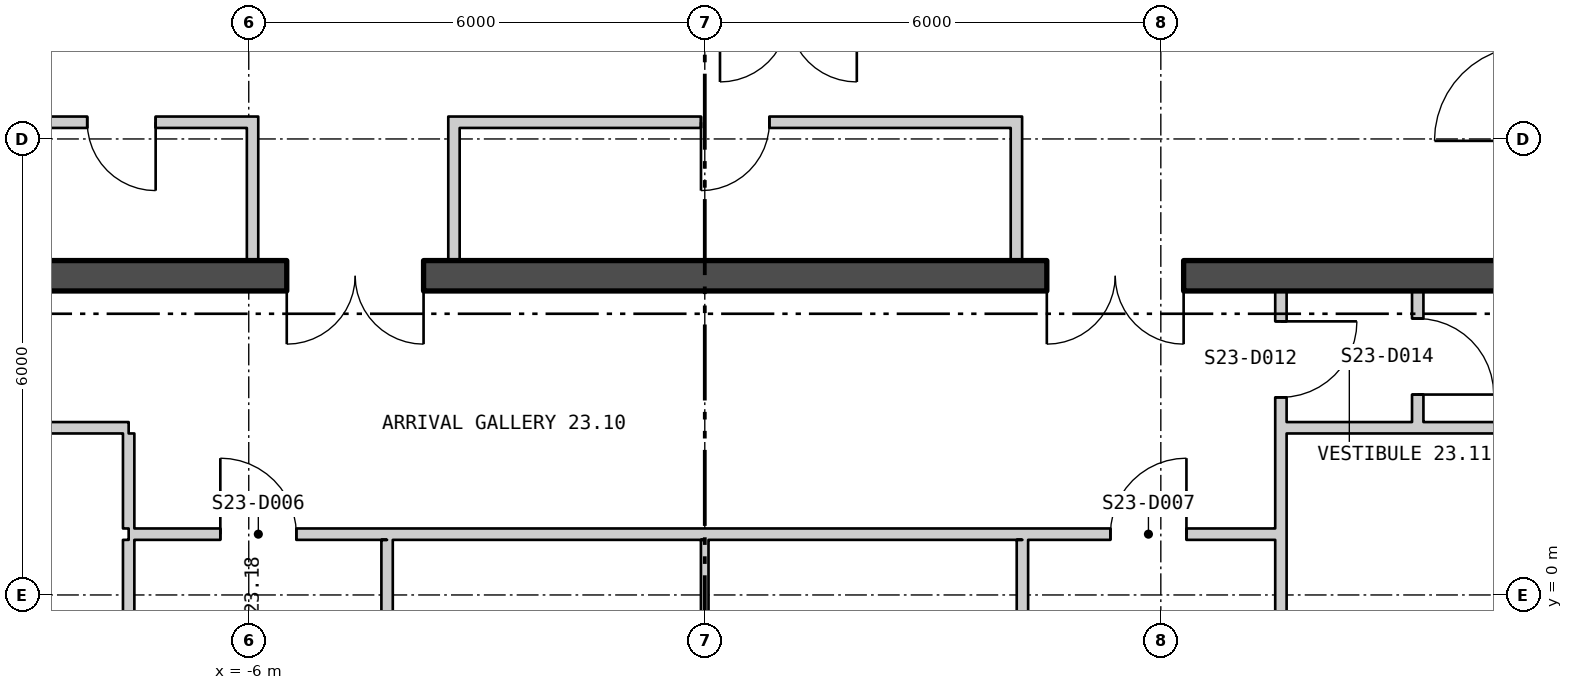
"""IFC4 building model, lengths in metres.
Left out: names, types, materials, properties, quantities, classifications, styles, units other than length and angle.
Written with IfcOpenShell. Run it as: python <this file> out.ifc"""

import sys

from ifc_helpers import new_model, si_unit, direction, frame, frame_2d, origin, place, context, subcontext, project, spatial, polyline, rectangle, outline, extrude, element, fill, save


model = new_model("IFC4")
c1 = context("Model", 3, precision=1e-05, world=origin(), true_north=direction((0.0, 1.0)))
c2 = subcontext(c1, "Body", "Model", "MODEL_VIEW")
j1 = project(units=[si_unit("LENGTHUNIT", "METRE"), si_unit("PLANEANGLEUNIT", "RADIAN")], contexts=[c1])
p1 = place(None, origin())
s1 = spatial("IfcSite", under=j1, at=p1, CompositionType="ELEMENT")
p2 = place(p1, origin())
s2 = spatial("IfcBuilding", under=s1, at=p2, CompositionType="ELEMENT")
p3 = place(p2, frame((0.0, 0.0, 304.2)))
s3 = spatial("IfcBuildingStorey", under=s2, at=p3, CompositionType="ELEMENT", Elevation=304.2)
p4 = place(p3, frame((-25.095, 16.112, -0.18), z_axis=(0.0, 0.0, 1.0), x_axis=(0.500000141277, -0.866025322218, 0.0)))
e1 = element("IfcWall", 1, at=p4, inside=s3, PredefinedType="SOLIDWALL", context=c2, shape_type="SweptSolid", body=[
    extrude(outline(polyline([(-0.13, -0.225), (45.86, -0.225), (45.6, 0.225), (0.13, 0.225), (-0.13, -0.225)])), origin(), (0.0, 0.0, 1.0), 3.98),
])
p5 = place(p4, frame((1.424, 0.0, 1.08)))
e2 = element("IfcOpeningElement", 2, at=p5, cuts=e1, PredefinedType="OPENING", context=c2, shape_type="SweptSolid", body=[
    extrude(rectangle(XDim=2.4, YDim=2.3, at=frame_2d((1.2, 1.15))), frame((0.0, 0.235, 0.0), z_axis=(0.0, -1.0, 0.0), x_axis=(1.0, 0.0, 0.0)), (0.0, 0.0, 1.0), 0.47),
])
p6 = place(p4, frame((5.892, 0.0, 1.08)))
e3 = element("IfcOpeningElement", 3, at=p6, cuts=e1, PredefinedType="OPENING", context=c2, shape_type="SweptSolid", body=[
    extrude(rectangle(XDim=2.4, YDim=2.3, at=frame_2d((1.2, 1.15))), frame((0.0, 0.235, 0.0), z_axis=(0.0, -1.0, 0.0), x_axis=(1.0, 0.0, 0.0)), (0.0, 0.0, 1.0), 0.47),
])
p7 = place(p4, frame((10.399, 0.0, 1.08)))
e4 = element("IfcOpeningElement", 4, at=p7, cuts=e1, PredefinedType="OPENING", context=c2, shape_type="SweptSolid", body=[
    extrude(rectangle(XDim=2.4, YDim=2.3, at=frame_2d((1.2, 1.15))), frame((0.0, 0.235, 0.0), z_axis=(0.0, -1.0, 0.0), x_axis=(1.0, 0.0, 0.0)), (0.0, 0.0, 1.0), 0.47),
])
p8 = place(p4, frame((14.905, 0.0, 1.08)))
e5 = element("IfcOpeningElement", 5, at=p8, cuts=e1, PredefinedType="OPENING", context=c2, shape_type="SweptSolid", body=[
    extrude(rectangle(XDim=2.4, YDim=2.3, at=frame_2d((1.2, 1.15))), frame((0.0, 0.235, 0.0), z_axis=(0.0, -1.0, 0.0), x_axis=(1.0, 0.0, 0.0)), (0.0, 0.0, 1.0), 0.47),
])
p9 = place(p4, frame((19.412, 0.0, 1.08)))
e6 = element("IfcOpeningElement", 6, at=p9, cuts=e1, PredefinedType="OPENING", context=c2, shape_type="SweptSolid", body=[
    extrude(rectangle(XDim=2.4, YDim=2.3, at=frame_2d((1.2, 1.15))), frame((0.0, 0.235, 0.0), z_axis=(0.0, -1.0, 0.0), x_axis=(1.0, 0.0, 0.0)), (0.0, 0.0, 1.0), 0.47),
])
p10 = place(p4, frame((28.425, 0.0, 1.08)))
e7 = element("IfcOpeningElement", 7, at=p10, cuts=e1, PredefinedType="OPENING", context=c2, shape_type="SweptSolid", body=[
    extrude(rectangle(XDim=2.4, YDim=2.3, at=frame_2d((1.2, 1.15))), frame((0.0, 0.235, 0.0), z_axis=(0.0, -1.0, 0.0), x_axis=(1.0, 0.0, 0.0)), (0.0, 0.0, 1.0), 0.47),
])
p11 = place(p4, frame((32.932, 0.0, 1.08)))
e8 = element("IfcOpeningElement", 8, at=p11, cuts=e1, PredefinedType="OPENING", context=c2, shape_type="SweptSolid", body=[
    extrude(rectangle(XDim=2.4, YDim=2.3, at=frame_2d((1.2, 1.15))), frame((0.0, 0.235, 0.0), z_axis=(0.0, -1.0, 0.0), x_axis=(1.0, 0.0, 0.0)), (0.0, 0.0, 1.0), 0.47),
])
p12 = place(p4, frame((37.438, 0.0, 1.08)))
e9 = element("IfcOpeningElement", 9, at=p12, cuts=e1, PredefinedType="OPENING", context=c2, shape_type="SweptSolid", body=[
    extrude(rectangle(XDim=2.4, YDim=2.3, at=frame_2d((1.2, 1.15))), frame((0.0, 0.235, 0.0), z_axis=(0.0, -1.0, 0.0), x_axis=(1.0, 0.0, 0.0)), (0.0, 0.0, 1.0), 0.47),
])
p13 = place(p4, frame((41.907, 0.0, 1.08)))
e10 = element("IfcOpeningElement", 10, at=p13, cuts=e1, PredefinedType="OPENING", context=c2, shape_type="SweptSolid", body=[
    extrude(rectangle(XDim=2.4, YDim=2.3, at=frame_2d((1.2, 1.15))), frame((0.0, 0.235, 0.0), z_axis=(0.0, -1.0, 0.0), x_axis=(1.0, 0.0, 0.0)), (0.0, 0.0, 1.0), 0.47),
])
p14 = place(p3, frame((2.23, -23.491, -0.18), z_axis=(0.0, 0.0, 1.0), x_axis=(0.500000141277, 0.866025322218, 0.0)))
e11 = element("IfcWall", 11, at=p14, inside=s3, PredefinedType="SOLIDWALL", context=c2, shape_type="SweptSolid", body=[
    extrude(outline(polyline([(-0.13, -0.225), (45.86, -0.225), (45.6, 0.225), (0.13, 0.225), (-0.13, -0.225)])), origin(), (0.0, 0.0, 1.0), 3.98),
])
p15 = place(p14, frame((1.424, 0.0, 1.08)))
e12 = element("IfcOpeningElement", 12, at=p15, cuts=e11, PredefinedType="OPENING", context=c2, shape_type="SweptSolid", body=[
    extrude(rectangle(XDim=2.4, YDim=2.3, at=frame_2d((1.2, 1.15))), frame((0.0, 0.235, 0.0), z_axis=(0.0, -1.0, 0.0), x_axis=(1.0, 0.0, 0.0)), (0.0, 0.0, 1.0), 0.47),
])
p16 = place(p14, frame((5.892, 0.0, 1.08)))
e13 = element("IfcOpeningElement", 13, at=p16, cuts=e11, PredefinedType="OPENING", context=c2, shape_type="SweptSolid", body=[
    extrude(rectangle(XDim=2.4, YDim=2.3, at=frame_2d((1.2, 1.15))), frame((0.0, 0.235, 0.0), z_axis=(0.0, -1.0, 0.0), x_axis=(1.0, 0.0, 0.0)), (0.0, 0.0, 1.0), 0.47),
])
p17 = place(p14, frame((10.399, 0.0, 1.08)))
e14 = element("IfcOpeningElement", 14, at=p17, cuts=e11, PredefinedType="OPENING", context=c2, shape_type="SweptSolid", body=[
    extrude(rectangle(XDim=2.4, YDim=2.3, at=frame_2d((1.2, 1.15))), frame((0.0, 0.235, 0.0), z_axis=(0.0, -1.0, 0.0), x_axis=(1.0, 0.0, 0.0)), (0.0, 0.0, 1.0), 0.47),
])
p18 = place(p14, frame((14.905, 0.0, 1.08)))
e15 = element("IfcOpeningElement", 15, at=p18, cuts=e11, PredefinedType="OPENING", context=c2, shape_type="SweptSolid", body=[
    extrude(rectangle(XDim=2.4, YDim=2.3, at=frame_2d((1.2, 1.15))), frame((0.0, 0.235, 0.0), z_axis=(0.0, -1.0, 0.0), x_axis=(1.0, 0.0, 0.0)), (0.0, 0.0, 1.0), 0.47),
])
p19 = place(p14, frame((19.412, 0.0, 1.08)))
e16 = element("IfcOpeningElement", 16, at=p19, cuts=e11, PredefinedType="OPENING", context=c2, shape_type="SweptSolid", body=[
    extrude(rectangle(XDim=2.4, YDim=2.3, at=frame_2d((1.2, 1.15))), frame((0.0, 0.235, 0.0), z_axis=(0.0, -1.0, 0.0), x_axis=(1.0, 0.0, 0.0)), (0.0, 0.0, 1.0), 0.47),
])
p20 = place(p14, frame((23.918, 0.0, 1.08)))
e17 = element("IfcOpeningElement", 17, at=p20, cuts=e11, PredefinedType="OPENING", context=c2, shape_type="SweptSolid", body=[
    extrude(rectangle(XDim=2.4, YDim=2.3, at=frame_2d((1.2, 1.15))), frame((0.0, 0.235, 0.0), z_axis=(0.0, -1.0, 0.0), x_axis=(1.0, 0.0, 0.0)), (0.0, 0.0, 1.0), 0.47),
])
p21 = place(p14, frame((28.425, 0.0, 1.08)))
e18 = element("IfcOpeningElement", 18, at=p21, cuts=e11, PredefinedType="OPENING", context=c2, shape_type="SweptSolid", body=[
    extrude(rectangle(XDim=2.4, YDim=2.3, at=frame_2d((1.2, 1.15))), frame((0.0, 0.235, 0.0), z_axis=(0.0, -1.0, 0.0), x_axis=(1.0, 0.0, 0.0)), (0.0, 0.0, 1.0), 0.47),
])
p22 = place(p14, frame((32.932, 0.0, 1.08)))
e19 = element("IfcOpeningElement", 19, at=p22, cuts=e11, PredefinedType="OPENING", context=c2, shape_type="SweptSolid", body=[
    extrude(rectangle(XDim=2.4, YDim=2.3, at=frame_2d((1.2, 1.15))), frame((0.0, 0.235, 0.0), z_axis=(0.0, -1.0, 0.0), x_axis=(1.0, 0.0, 0.0)), (0.0, 0.0, 1.0), 0.47),
])
p23 = place(p14, frame((37.438, 0.0, 1.08)))
e20 = element("IfcOpeningElement", 20, at=p23, cuts=e11, PredefinedType="OPENING", context=c2, shape_type="SweptSolid", body=[
    extrude(rectangle(XDim=2.4, YDim=2.3, at=frame_2d((1.2, 1.15))), frame((0.0, 0.235, 0.0), z_axis=(0.0, -1.0, 0.0), x_axis=(1.0, 0.0, 0.0)), (0.0, 0.0, 1.0), 0.47),
])
p24 = place(p14, frame((41.907, 0.0, 1.08)))
e21 = element("IfcOpeningElement", 21, at=p24, cuts=e11, PredefinedType="OPENING", context=c2, shape_type="SweptSolid", body=[
    extrude(rectangle(XDim=2.4, YDim=2.3, at=frame_2d((1.2, 1.15))), frame((0.0, 0.235, 0.0), z_axis=(0.0, -1.0, 0.0), x_axis=(1.0, 0.0, 0.0)), (0.0, 0.0, 1.0), 0.47),
])
p25 = place(p3, frame((-14.5, 4.2, 0.0), z_axis=(0.0, 0.0, 1.0), x_axis=(1.0, 0.0, 0.0)))
e22 = element("IfcWall", 22, at=p25, inside=s3, PredefinedType="SHEAR", context=c2, shape_type="SweptSolid", body=[
    extrude(rectangle(XDim=29.0, YDim=0.4, at=frame_2d((14.5, 0.0))), origin(), (0.0, 0.0, 1.0), 4.0),
])
p26 = place(p25, frame((9.0, 0.0, 0.0)))
e23 = element("IfcOpeningElement", 23, at=p26, cuts=e22, PredefinedType="OPENING", context=c2, shape_type="SweptSolid", body=[
    extrude(rectangle(XDim=1.8, YDim=2.4, at=frame_2d((0.9, 1.2))), frame((0.0, 0.21, 0.0), z_axis=(0.0, -1.0, 0.0), x_axis=(1.0, 0.0, 0.0)), (0.0, 0.0, 1.0), 0.42),
])
p27 = place(p25, frame((19.0, 0.0, 0.0)))
e24 = element("IfcOpeningElement", 24, at=p27, cuts=e22, PredefinedType="OPENING", context=c2, shape_type="SweptSolid", body=[
    extrude(rectangle(XDim=1.8, YDim=2.4, at=frame_2d((0.9, 1.2))), frame((0.0, 0.21, 0.0), z_axis=(0.0, -1.0, 0.0), x_axis=(1.0, 0.0, 0.0)), (0.0, 0.0, 1.0), 0.42),
])
p28 = place(p3, frame((-5.95, 4.4, 0.0), z_axis=(0.0, 0.0, 1.0), x_axis=(0.0, 1.0, 0.0)))
e25 = element("IfcWall", 25, at=p28, inside=s3, PredefinedType="PARTITIONING", context=c2, shape_type="SweptSolid", body=[
    extrude(rectangle(XDim=1.895, YDim=0.15, at=frame_2d((0.948, 0.0))), origin(), (0.0, 0.0, 1.0), 4.0),
])
p29 = place(p3, frame((-9.325, 6.22, 0.0), z_axis=(0.0, 0.0, 1.0), x_axis=(1.0, 0.0, 0.0)))
e26 = element("IfcWall", 26, at=p29, inside=s3, PredefinedType="PARTITIONING", context=c2, shape_type="SweptSolid", body=[
    extrude(rectangle(XDim=3.3, YDim=0.15, at=frame_2d((1.65, 0.0))), origin(), (0.0, 0.0, 1.0), 4.0),
])
p30 = place(p29, frame((1.2, 0.0, 0.0)))
e27 = element("IfcOpeningElement", 27, at=p30, cuts=e26, PredefinedType="OPENING", context=c2, shape_type="SweptSolid", body=[
    extrude(rectangle(XDim=0.9, YDim=2.1, at=frame_2d((0.45, 1.05))), frame((0.0, 0.085, 0.0), z_axis=(0.0, -1.0, 0.0), x_axis=(1.0, 0.0, 0.0)), (0.0, 0.0, 1.0), 0.17),
])
for number, where, z_axis, x_axis in (
    (28, (-3.3, 4.4, 0.0), (0.0, 0.0, 1.0), (0.0, 1.0, 0.0)),
    (29, (4.1, 4.4, 0.0), (0.0, 0.0, 1.0), (0.0, 1.0, 0.0)),
):
    element("IfcWall", number, at=place(p3, frame(where, z_axis=z_axis, x_axis=x_axis)), inside=s3, PredefinedType="PARTITIONING", context=c2, shape_type="SweptSolid", body=[
        extrude(rectangle(XDim=1.895, YDim=0.15, at=frame_2d((0.948, 0.0))), origin(), (0.0, 0.0, 1.0), 4.0),
    ])
p31 = place(p3, frame((-3.225, 6.22, 0.0), z_axis=(0.0, 0.0, 1.0), x_axis=(1.0, 0.0, 0.0)))
e30 = element("IfcWall", 30, at=p31, inside=s3, PredefinedType="PARTITIONING", context=c2, shape_type="SweptSolid", body=[
    extrude(rectangle(XDim=7.25, YDim=0.15, at=frame_2d((3.625, 0.0))), origin(), (0.0, 0.0, 1.0), 4.0),
])
p32 = place(p31, frame((3.175, 0.0, 0.0)))
e31 = element("IfcOpeningElement", 31, at=p32, cuts=e30, PredefinedType="OPENING", context=c2, shape_type="SweptSolid", body=[
    extrude(rectangle(XDim=0.9, YDim=2.1, at=frame_2d((0.45, 1.05))), frame((0.0, 0.085, 0.0), z_axis=(0.0, -1.0, 0.0), x_axis=(1.0, 0.0, 0.0)), (0.0, 0.0, 1.0), 0.17),
])
p33 = place(p3, frame((-16.225, 2.2, 0.0), z_axis=(0.0, 0.0, 1.0), x_axis=(1.0, 0.0, 0.0)))
e32 = element("IfcWall", 32, at=p33, inside=s3, PredefinedType="PARTITIONING", context=c2, shape_type="SweptSolid", body=[
    extrude(rectangle(XDim=8.645, YDim=0.15, at=frame_2d((4.322, 0.0))), origin(), (0.0, 0.0, 1.0), 4.0),
])
p34 = place(p33, frame((5.714, 0.0, 0.0)))
e33 = element("IfcOpeningElement", 33, at=p34, cuts=e32, PredefinedType="OPENING", context=c2, shape_type="SweptSolid", body=[
    extrude(rectangle(XDim=1.0, YDim=2.1, at=frame_2d((0.5, 1.05))), frame((0.0, 0.085, 0.0), z_axis=(0.0, -1.0, 0.0), x_axis=(1.0, 0.0, 0.0)), (0.0, 0.0, 1.0), 0.17),
])
p35 = place(p3, frame((-7.58, -2.582, 0.0), z_axis=(0.0, 0.0, 1.0), x_axis=(0.0, 1.0, 0.0)))
e34 = element("IfcWall", 34, at=p35, inside=s3, PredefinedType="PARTITIONING", context=c2, shape_type="SweptSolid", body=[
    extrude(rectangle(XDim=3.307, YDim=0.15, at=frame_2d((1.653, 0.0))), origin(), (0.0, 0.0, 1.0), 4.0),
])
p36 = place(p3, frame((-7.58, 0.8, 0.0), z_axis=(0.0, 0.0, 1.0), x_axis=(1.0, 0.0, 0.0)))
e35 = element("IfcWall", 35, at=p36, inside=s3, PredefinedType="PARTITIONING", context=c2, shape_type="SweptSolid", body=[
    extrude(rectangle(XDim=15.085, YDim=0.15, at=frame_2d((7.543, 0.0))), origin(), (0.0, 0.0, 1.0), 4.0),
])
p37 = place(p36, frame((1.206, 0.0, 0.0)))
e36 = element("IfcOpeningElement", 36, at=p37, cuts=e35, PredefinedType="OPENING", context=c2, shape_type="SweptSolid", body=[
    extrude(rectangle(XDim=1.0, YDim=2.1, at=frame_2d((0.5, 1.05))), frame((0.0, 0.085, 0.0), z_axis=(0.0, -1.0, 0.0), x_axis=(1.0, 0.0, 0.0)), (0.0, 0.0, 1.0), 0.17),
])
p38 = place(p36, frame((12.917, 0.0, 0.0)))
e37 = element("IfcOpeningElement", 37, at=p38, cuts=e35, PredefinedType="OPENING", context=c2, shape_type="SweptSolid", body=[
    extrude(rectangle(XDim=1.0, YDim=2.1, at=frame_2d((0.5, 1.05))), frame((0.0, 0.085, 0.0), z_axis=(0.0, -1.0, 0.0), x_axis=(1.0, 0.0, 0.0)), (0.0, 0.0, 1.0), 0.17),
])
p39 = place(p3, frame((-7.58, 0.875, 0.0), z_axis=(0.0, 0.0, 1.0), x_axis=(0.0, 1.0, 0.0)))
e38 = element("IfcWall", 38, at=p39, inside=s3, PredefinedType="PARTITIONING", context=c2, shape_type="SweptSolid", body=[
    extrude(rectangle(XDim=1.25, YDim=0.15, at=frame_2d((0.625, 0.0))), origin(), (0.0, 0.0, 1.0), 4.0),
])
p40 = place(p3, frame((-4.18, 0.725, 0.0), z_axis=(0.0, 0.0, 1.0), x_axis=(0.000237812122, -0.999999971723, 0.0)))
e39 = element("IfcWall", 39, at=p40, inside=s3, PredefinedType="PARTITIONING", context=c2, shape_type="SweptSolid", body=[
    extrude(rectangle(XDim=4.205, YDim=0.15, at=frame_2d((2.103, 0.0))), origin(), (0.0, 0.0, 1.0), 4.0),
])
p41 = place(p40, frame((3.005, 0.0, 0.0)))
e40 = element("IfcOpeningElement", 40, at=p41, cuts=e39, PredefinedType="OPENING", context=c2, shape_type="SweptSolid", body=[
    extrude(rectangle(XDim=1.0, YDim=2.1, at=frame_2d((0.5, 1.05))), frame((0.0, 0.085, 0.0), z_axis=(0.0, -1.0, 0.0), x_axis=(1.0, 0.0, 0.0)), (0.0, 0.0, 1.0), 0.17),
])
p42 = place(p3, frame((-0.001, 0.725, 0.0), z_axis=(0.0, 0.0, 1.0), x_axis=(0.000235294111, -0.999999972318, 0.0)))
e41 = element("IfcWall", 41, at=p42, inside=s3, PredefinedType="PARTITIONING", context=c2, shape_type="SweptSolid", body=[
    extrude(rectangle(XDim=3.825, YDim=0.1, at=frame_2d((1.913, 0.0))), origin(), (0.0, 0.0, 1.0), 3.55),
])
p43 = place(p3, frame((4.179, 0.725, 0.0), z_axis=(0.0, 0.0, 1.0), x_axis=(0.000237812122, -0.999999971723, 0.0)))
e42 = element("IfcWall", 42, at=p43, inside=s3, PredefinedType="PARTITIONING", context=c2, shape_type="SweptSolid", body=[
    extrude(rectangle(XDim=4.205, YDim=0.15, at=frame_2d((2.103, 0.0))), origin(), (0.0, 0.0, 1.0), 4.0),
])
p44 = place(p43, frame((3.005, 0.0, 0.0)))
e43 = element("IfcOpeningElement", 43, at=p44, cuts=e42, PredefinedType="OPENING", context=c2, shape_type="SweptSolid", body=[
    extrude(rectangle(XDim=1.0, YDim=2.1, at=frame_2d((0.5, 1.05))), frame((0.0, 0.085, 0.0), z_axis=(0.0, -1.0, 0.0), x_axis=(1.0, 0.0, 0.0)), (0.0, 0.0, 1.0), 0.17),
])
p45 = place(p3, frame((7.58, -13.675, 0.0), z_axis=(0.0, 0.0, 1.0), x_axis=(0.0, 1.0, 0.0)))
e44 = element("IfcWall", 44, at=p45, inside=s3, PredefinedType="PARTITIONING", context=c2, shape_type="SweptSolid", body=[
    extrude(rectangle(XDim=17.675, YDim=0.15, at=frame_2d((8.838, 0.0))), origin(), (0.0, 0.0, 1.0), 4.0),
])
p46 = place(p45, frame((3.684, 0.0, 0.0)))
e45 = element("IfcOpeningElement", 45, at=p46, cuts=e44, PredefinedType="OPENING", context=c2, shape_type="SweptSolid", body=[
    extrude(rectangle(XDim=1.0, YDim=2.1, at=frame_2d((0.5, 1.05))), frame((0.0, 0.085, 0.0), z_axis=(0.0, -1.0, 0.0), x_axis=(1.0, 0.0, 0.0)), (0.0, 0.0, 1.0), 0.17),
])
p47 = place(p45, frame((16.275, 0.0, 0.0)))
e46 = element("IfcOpeningElement", 46, at=p47, cuts=e44, PredefinedType="OPENING", context=c2, shape_type="SweptSolid", body=[
    extrude(rectangle(XDim=1.0, YDim=2.1, at=frame_2d((0.5, 1.05))), frame((0.0, 0.085, 0.0), z_axis=(0.0, -1.0, 0.0), x_axis=(1.0, 0.0, 0.0)), (0.0, 0.0, 1.0), 0.17),
])
p48 = place(p3, frame((7.655, 2.2, 0.0), z_axis=(0.0, 0.0, 1.0), x_axis=(1.0, 0.0, 0.0)))
e47 = element("IfcWall", 47, at=p48, inside=s3, PredefinedType="PARTITIONING", context=c2, shape_type="SweptSolid", body=[
    extrude(rectangle(XDim=8.57, YDim=0.15, at=frame_2d((4.285, 0.0))), origin(), (0.0, 0.0, 1.0), 4.0),
])
p49 = place(p48, frame((3.334, 0.0, 0.0)))
e48 = element("IfcOpeningElement", 48, at=p49, cuts=e47, PredefinedType="OPENING", context=c2, shape_type="SweptSolid", body=[
    extrude(rectangle(XDim=1.8, YDim=2.1, at=frame_2d((0.9, 1.05))), frame((0.0, 0.085, 0.0), z_axis=(0.0, -1.0, 0.0), x_axis=(1.0, 0.0, 0.0)), (0.0, 0.0, 1.0), 0.17),
])
p50 = place(p3, frame((9.38, 2.275, 0.0), z_axis=(0.0, 0.0, 1.0), x_axis=(0.0, 1.0, 0.0)))
e49 = element("IfcWall", 49, at=p50, inside=s3, PredefinedType="PARTITIONING", context=c2, shape_type="SweptSolid", body=[
    extrude(rectangle(XDim=1.725, YDim=0.15, at=frame_2d((0.863, 0.0))), origin(), (0.0, 0.0, 1.0), 4.0),
])
p51 = place(p50, frame((0.362, 0.0, 0.0)))
e50 = element("IfcOpeningElement", 50, at=p51, cuts=e49, PredefinedType="OPENING", context=c2, shape_type="SweptSolid", body=[
    extrude(rectangle(XDim=1.0, YDim=2.1, at=frame_2d((0.5, 1.05))), frame((0.0, 0.085, 0.0), z_axis=(0.0, -1.0, 0.0), x_axis=(1.0, 0.0, 0.0)), (0.0, 0.0, 1.0), 0.17),
])
p52 = place(p30, origin())
e51 = element("IfcDoor", 51, at=p52, inside=s3, OperationType="SINGLE_SWING_RIGHT", PredefinedType="DOOR", context=c2, shape_type="SweptSolid", body=[
    extrude(rectangle(XDim=0.9, YDim=2.1, at=frame_2d((0.45, 1.05))), frame((0.0, 0.025, 0.0), z_axis=(0.0, -1.0, 0.0), x_axis=(1.0, 0.0, 0.0)), (0.0, 0.0, 1.0), 0.05),
])
fill(e27, e51)
p53 = place(p32, origin())
e52 = element("IfcDoor", 52, at=p53, inside=s3, OperationType="SINGLE_SWING_LEFT", PredefinedType="DOOR", context=c2, shape_type="SweptSolid", body=[
    extrude(rectangle(XDim=0.9, YDim=2.1, at=frame_2d((0.45, 1.05))), frame((0.0, 0.025, 0.0), z_axis=(0.0, -1.0, 0.0), x_axis=(1.0, 0.0, 0.0)), (0.0, 0.0, 1.0), 0.05),
])
fill(e31, e52)
p54 = place(p26, origin())
e53 = element("IfcDoor", 53, at=p54, inside=s3, OperationType="DOUBLE_DOOR_SINGLE_SWING", PredefinedType="DOOR", context=c2, shape_type="SweptSolid", body=[
    extrude(rectangle(XDim=1.8, YDim=2.4, at=frame_2d((0.9, 1.2))), frame((0.0, 0.025, 0.0), z_axis=(0.0, -1.0, 0.0), x_axis=(1.0, 0.0, 0.0)), (0.0, 0.0, 1.0), 0.05),
])
fill(e23, e53)
p55 = place(p27, origin())
e54 = element("IfcDoor", 54, at=p55, inside=s3, OperationType="DOUBLE_DOOR_SINGLE_SWING", PredefinedType="DOOR", context=c2, shape_type="SweptSolid", body=[
    extrude(rectangle(XDim=1.8, YDim=2.4, at=frame_2d((0.9, 1.2))), frame((0.0, 0.025, 0.0), z_axis=(0.0, -1.0, 0.0), x_axis=(1.0, 0.0, 0.0)), (0.0, 0.0, 1.0), 0.05),
])
fill(e24, e54)
p56 = place(p37, origin())
e55 = element("IfcDoor", 55, at=p56, inside=s3, OperationType="SINGLE_SWING_RIGHT", PredefinedType="DOOR", context=c2, shape_type="SweptSolid", body=[
    extrude(rectangle(XDim=1.0, YDim=2.1, at=frame_2d((0.5, 1.05))), frame((0.0, 0.025, 0.0), z_axis=(0.0, -1.0, 0.0), x_axis=(1.0, 0.0, 0.0)), (0.0, 0.0, 1.0), 0.05),
])
fill(e36, e55)
p57 = place(p38, origin())
e56 = element("IfcDoor", 56, at=p57, inside=s3, OperationType="SINGLE_SWING_LEFT", PredefinedType="DOOR", context=c2, shape_type="SweptSolid", body=[
    extrude(rectangle(XDim=1.0, YDim=2.1, at=frame_2d((0.5, 1.05))), frame((0.0, 0.025, 0.0), z_axis=(0.0, -1.0, 0.0), x_axis=(1.0, 0.0, 0.0)), (0.0, 0.0, 1.0), 0.05),
])
fill(e37, e56)
p58 = place(p47, origin())
e57 = element("IfcDoor", 57, at=p58, inside=s3, OperationType="SINGLE_SWING_RIGHT", PredefinedType="DOOR", context=c2, shape_type="SweptSolid", body=[
    extrude(rectangle(XDim=1.0, YDim=2.1, at=frame_2d((0.5, 1.05))), frame((0.0, 0.025, 0.0), z_axis=(0.0, -1.0, 0.0), x_axis=(1.0, 0.0, 0.0)), (0.0, 0.0, 1.0), 0.05),
])
fill(e46, e57)
p59 = place(p51, origin())
e58 = element("IfcDoor", 58, at=p59, inside=s3, OperationType="SINGLE_SWING_LEFT", PredefinedType="DOOR", context=c2, shape_type="SweptSolid", body=[
    extrude(rectangle(XDim=1.0, YDim=2.1, at=frame_2d((0.5, 1.05))), frame((0.0, 0.025, 0.0), z_axis=(0.0, -1.0, 0.0), x_axis=(1.0, 0.0, 0.0)), (0.0, 0.0, 1.0), 0.05),
])
fill(e50, e58)
save(model, sys.argv[1])
